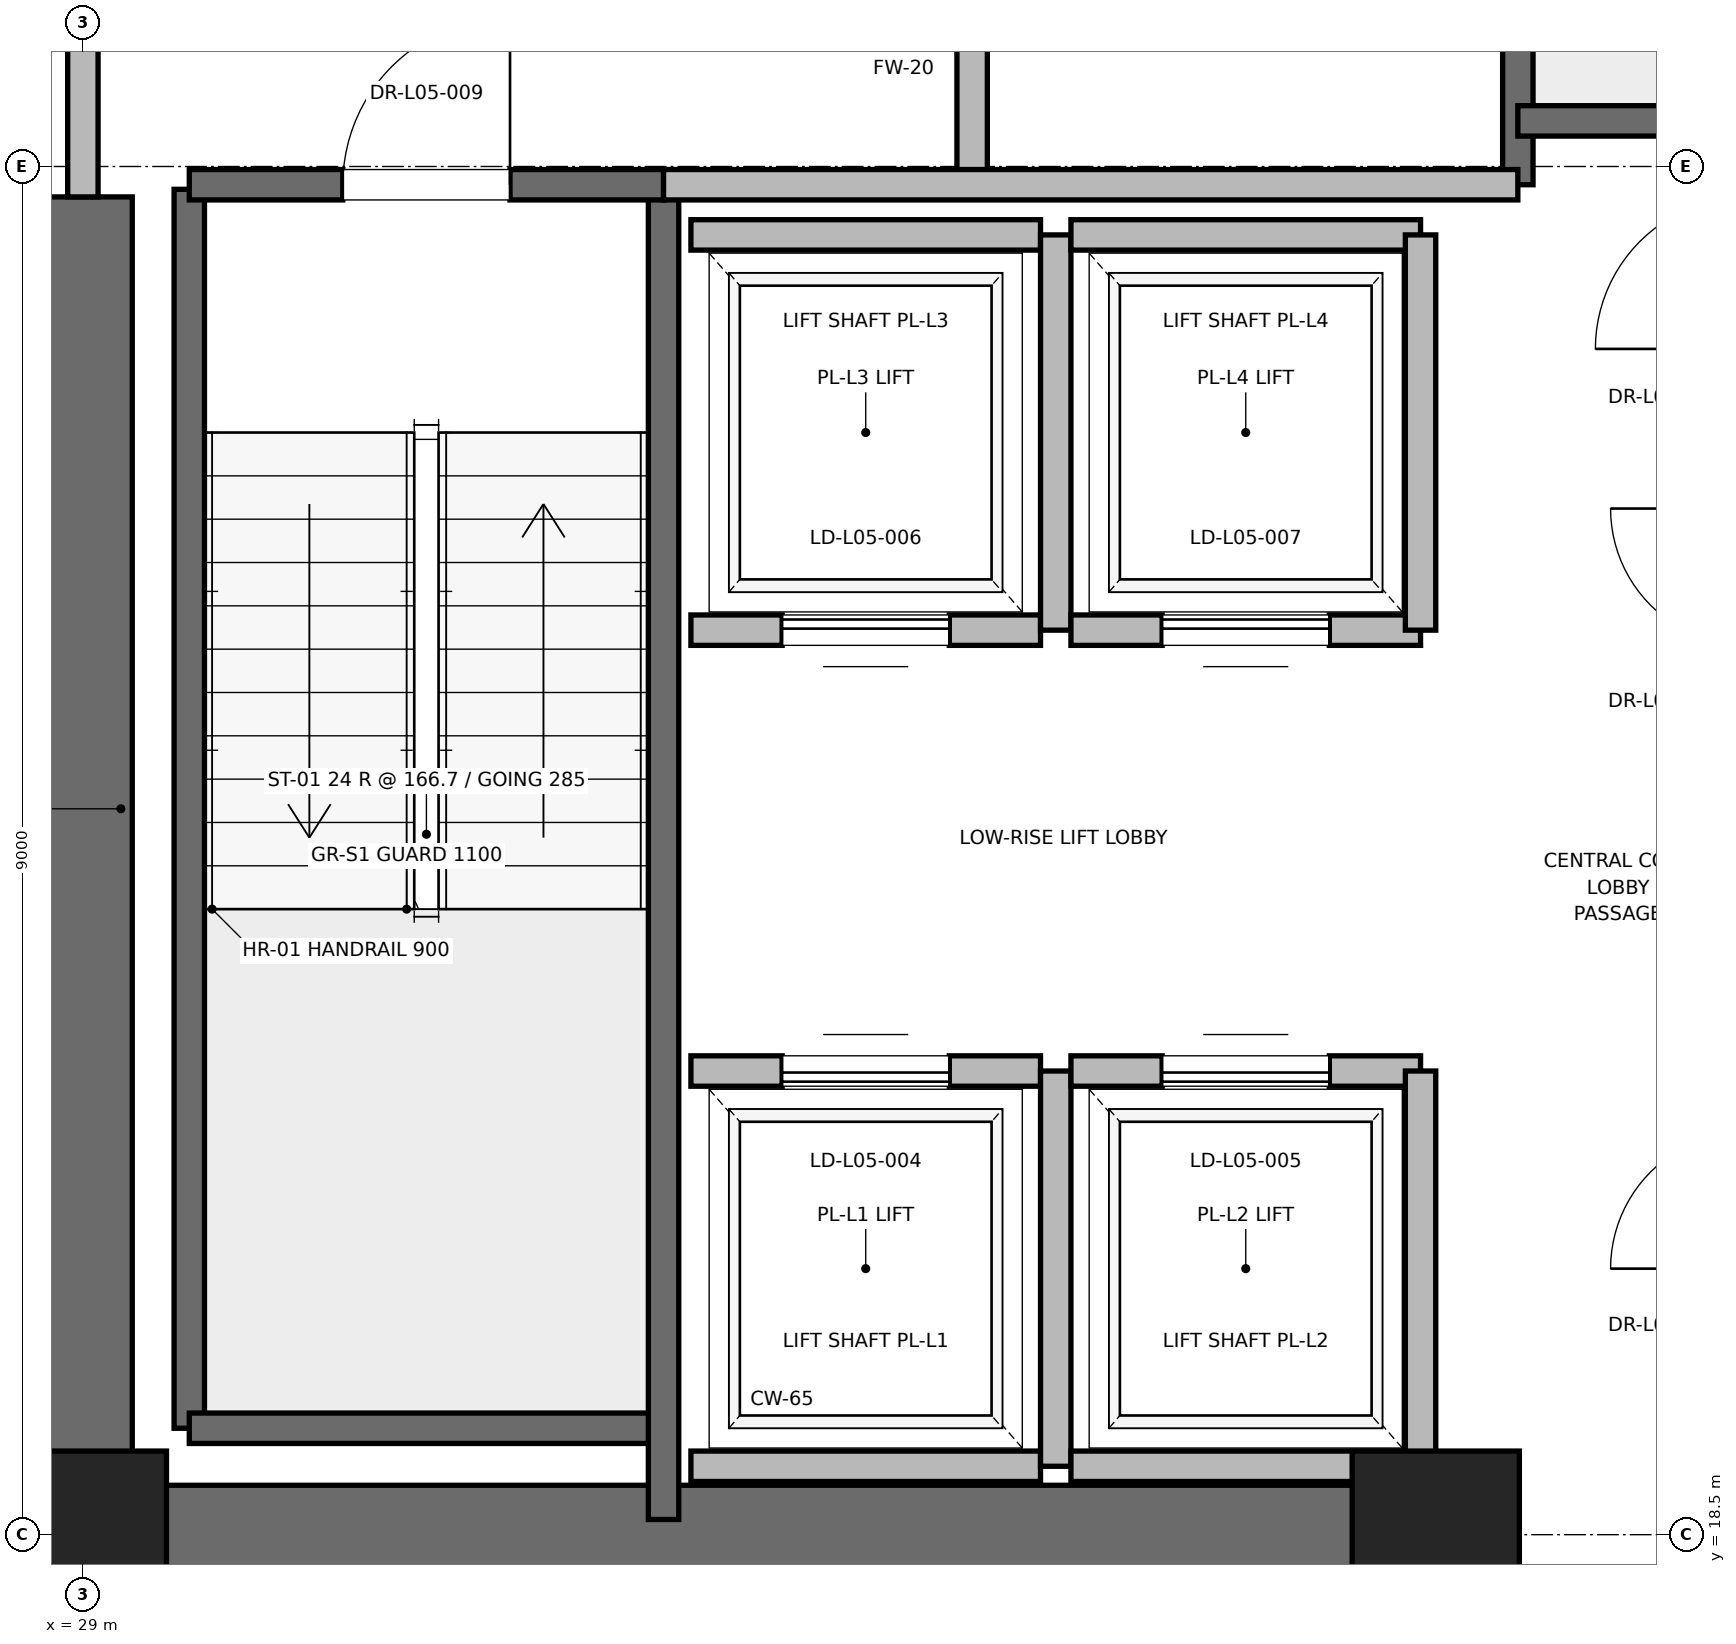
"""IFC4 building model, lengths in metres.
Left out: names, types, materials, properties, quantities, classifications, styles, units other than length and angle.
Written with IfcOpenShell. Run it as: python <this file> out.ifc"""

import sys

from ifc_helpers import new_model, si_unit, direction, frame, frame_2d, origin, origin_2d, place, context, subcontext, project, spatial, rectangle, extrude, element, fill, save


model = new_model("IFC4")
c1 = context("Model", 3, precision=1e-05, world=origin(), true_north=direction((0.0, 1.0)))
c2 = subcontext(c1, "Body", "Model", "MODEL_VIEW")
j1 = project(units=[si_unit("LENGTHUNIT", "METRE"), si_unit("PLANEANGLEUNIT", "RADIAN")], contexts=[c1])
p1 = place(None, origin())
s1 = spatial("IfcSite", under=j1, at=p1, CompositionType="ELEMENT")
p2 = place(p1, origin())
s2 = spatial("IfcBuilding", under=s1, at=p2, CompositionType="ELEMENT")
p3 = place(p2, frame((0.0, 0.0, 27.6)))
s3 = spatial("IfcBuildingStorey", under=s2, at=p3, CompositionType="ELEMENT", Elevation=27.6)
for number, where, z_axis, x_axis in (
    (1, (29.0, 18.5, 0.0), (0.0, 0.0, 1.0), (1.0, 0.0, 0.0)),
    (2, (37.9, 18.5, 0.0), (0.0, 0.0, 1.0), (1.0, 0.0, 0.0)),
):
    element("IfcColumn", number, at=place(p3, frame(where, z_axis=z_axis, x_axis=x_axis)), inside=s3, PredefinedType="PILASTER", context=c2, shape_type="SweptSolid", body=[
        extrude(rectangle(XDim=1.1, YDim=1.1, at=origin_2d()), origin(), (0.0, 0.0, 1.0), 4.0),
    ])
p4 = place(p3, frame((29.0, 18.5, 0.0), z_axis=(0.0, 0.0, 1.0), x_axis=(1.0, 0.0, 0.0)))
e3 = element("IfcWall", 3, at=p4, inside=s3, PredefinedType="SHEAR", context=c2, shape_type="SweptSolid", body=[
    extrude(rectangle(XDim=9.2, YDim=0.65, at=frame_2d((4.6, 0.0))), origin(), (0.0, 0.0, 1.0), 3.76),
])
p5 = place(p3, frame((29.0, 18.5, 0.0), z_axis=(0.0, 0.0, 1.0), x_axis=(0.0, 1.0, 0.0)))
e4 = element("IfcWall", 4, at=p5, inside=s3, PredefinedType="SHEAR", context=c2, shape_type="SweptSolid", body=[
    extrude(rectangle(XDim=8.8, YDim=0.65, at=frame_2d((4.4, 0.0))), origin(), (0.0, 0.0, 1.0), 3.76),
])
p6 = place(p3, frame((29.7, 19.2, 0.0), z_axis=(0.0, 0.0, 1.0), x_axis=(0.0, 1.0, 0.0)))
e5 = element("IfcWall", 5, at=p6, inside=s3, PredefinedType="SOLIDWALL", context=c2, shape_type="SweptSolid", body=[
    extrude(rectangle(XDim=8.15, YDim=0.2, at=frame_2d((4.075, 0.0))), origin(), (0.0, 0.0, 1.0), 3.76),
])
p7 = place(p3, frame((29.7, 19.2, 0.0), z_axis=(0.0, 0.0, 1.0), x_axis=(1.0, 0.0, 0.0)))
e6 = element("IfcWall", 6, at=p7, inside=s3, PredefinedType="SOLIDWALL", context=c2, shape_type="SweptSolid", body=[
    extrude(rectangle(XDim=3.12, YDim=0.2, at=frame_2d((1.56, 0.0))), origin(), (0.0, 0.0, 1.0), 3.76),
])
p8 = place(p3, frame((32.82, 18.6, 0.0), z_axis=(0.0, 0.0, 1.0), x_axis=(0.0, 1.0, 0.0)))
e7 = element("IfcWall", 7, at=p8, inside=s3, PredefinedType="SOLIDWALL", context=c2, shape_type="SweptSolid", body=[
    extrude(rectangle(XDim=8.78, YDim=0.2, at=frame_2d((4.39, 0.0))), origin(), (0.0, 0.0, 1.0), 3.76),
])
p9 = place(p3, frame((29.7, 27.38, 0.0), z_axis=(0.0, 0.0, 1.0), x_axis=(1.0, 0.0, 0.0)))
e8 = element("IfcWall", 8, at=p9, inside=s3, PredefinedType="SOLIDWALL", context=c2, shape_type="SweptSolid", body=[
    extrude(rectangle(XDim=3.12, YDim=0.2, at=frame_2d((1.56, 0.0))), origin(), (0.0, 0.0, 1.0), 3.76),
])
p10 = place(p9, frame((1.01, 0.0, 0.0)))
e9 = element("IfcOpeningElement", 9, at=p10, cuts=e8, PredefinedType="OPENING", context=c2, shape_type="SweptSolid", body=[
    extrude(rectangle(XDim=1.1, YDim=2.15, at=frame_2d((0.55, 1.075))), frame((0.0, 0.1, 0.0), z_axis=(0.0, -1.0, 0.0), x_axis=(1.0, 0.0, 0.0)), (0.0, 0.0, 1.0), 0.2),
])
p11 = place(p3, frame((38.44, 27.38, 0.0), z_axis=(0.0, 0.0, 1.0), x_axis=(0.0, 1.0, 0.0)))
e10 = element("IfcWall", 10, at=p11, inside=s3, PredefinedType="SOLIDWALL", context=c2, shape_type="SweptSolid", body=[
    extrude(rectangle(XDim=8.87, YDim=0.2, at=frame_2d((4.435, 0.0))), origin(), (0.0, 0.0, 1.0), 3.76),
])
p12 = place(p3, frame((38.44, 27.8, 0.0), z_axis=(0.0, 0.0, 1.0), x_axis=(1.0, 0.0, 0.0)))
e11 = element("IfcWall", 11, at=p12, inside=s3, PredefinedType="SOLIDWALL", context=c2, shape_type="SweptSolid", body=[
    extrude(rectangle(XDim=3.32, YDim=0.2, at=frame_2d((1.66, 0.0))), origin(), (0.0, 0.0, 1.0), 3.76),
])
p13 = place(p3, frame((34.85, 27.38, 0.0), z_axis=(0.0, 0.0, 1.0), x_axis=(0.0, 1.0, 0.0)))
e12 = element("IfcWall", 12, at=p13, inside=s3, PredefinedType="PARTITIONING", context=c2, shape_type="SweptSolid", body=[
    extrude(rectangle(XDim=3.37, YDim=0.2, at=frame_2d((1.685, 0.0))), origin(), (0.0, 0.0, 1.0), 3.76),
])
p14 = place(p13, frame((1.11, 0.0, 0.0)))
e13 = element("IfcOpeningElement", 13, at=p14, cuts=e12, PredefinedType="OPENING", context=c2, shape_type="SweptSolid", body=[
    extrude(rectangle(XDim=1.15, YDim=2.2, at=frame_2d((0.575, 1.1))), frame((0.0, 0.1, 0.0), z_axis=(0.0, -1.0, 0.0), x_axis=(1.0, 0.0, 0.0)), (0.0, 0.0, 1.0), 0.2),
])
p15 = place(p3, frame((29.0, 27.3, 0.0), z_axis=(0.0, 0.0, 1.0), x_axis=(0.0, 1.0, 0.0)))
e14 = element("IfcWall", 14, at=p15, inside=s3, PredefinedType="PARTITIONING", context=c2, shape_type="SweptSolid", body=[
    extrude(rectangle(XDim=3.4, YDim=0.2, at=frame_2d((1.7, 0.0))), origin(), (0.0, 0.0, 1.0), 2.54),
])
p16 = place(p15, frame((1.125, 0.0, 0.0)))
e15 = element("IfcOpeningElement", 15, at=p16, cuts=e14, PredefinedType="OPENING", context=c2, shape_type="SweptSolid", body=[
    extrude(rectangle(XDim=1.15, YDim=2.2, at=frame_2d((0.575, 1.1))), frame((0.0, 0.1, 0.0), z_axis=(0.0, -1.0, 0.0), x_axis=(1.0, 0.0, 0.0)), (0.0, 0.0, 1.0), 0.2),
])
p17 = place(p3, frame((32.82, 27.38, 0.0), z_axis=(0.0, 0.0, 1.0), x_axis=(1.0, 0.0, 0.0)))
e16 = element("IfcWall", 16, at=p17, inside=s3, PredefinedType="PARTITIONING", context=c2, shape_type="SweptSolid", body=[
    extrude(rectangle(XDim=5.62, YDim=0.2, at=frame_2d((2.81, 0.0))), origin(), (0.0, 0.0, 1.0), 3.76),
])
p18 = place(p3, frame((33.0, 18.95, 0.0), z_axis=(0.0, 0.0, 1.0), x_axis=(1.0, 0.0, 0.0)))
e17 = element("IfcWall", 17, at=p18, inside=s3, PredefinedType="SOLIDWALL", context=c2, shape_type="SweptSolid", body=[
    extrude(rectangle(XDim=2.3, YDim=0.2, at=frame_2d((1.15, 0.0))), origin(), (0.0, 0.0, 1.0), 3.76),
])
p19 = place(p3, frame((35.3, 21.55, 0.0), z_axis=(0.0, 0.0, 1.0), x_axis=(-1.0, 0.0, 0.0)))
e18 = element("IfcWall", 18, at=p19, inside=s3, PredefinedType="SOLIDWALL", context=c2, shape_type="SweptSolid", body=[
    extrude(rectangle(XDim=2.3, YDim=0.2, at=frame_2d((1.15, 0.0))), origin(), (0.0, 0.0, 1.0), 3.76),
])
p20 = place(p19, frame((0.6, 0.0, 0.0)))
e19 = element("IfcOpeningElement", 19, at=p20, cuts=e18, PredefinedType="OPENING", context=c2, shape_type="SweptSolid", body=[
    extrude(rectangle(XDim=1.1, YDim=2.2, at=frame_2d((0.55, 1.1))), frame((0.0, 0.1, 0.0), z_axis=(0.0, -1.0, 0.0), x_axis=(1.0, 0.0, 0.0)), (0.0, 0.0, 1.0), 0.2),
])
p21 = place(p3, frame((35.4, 18.95, 0.0), z_axis=(0.0, 0.0, 1.0), x_axis=(0.0, 1.0, 0.0)))
e20 = element("IfcWall", 20, at=p21, inside=s3, PredefinedType="SOLIDWALL", context=c2, shape_type="SweptSolid", body=[
    extrude(rectangle(XDim=2.6, YDim=0.2, at=frame_2d((1.3, 0.0))), origin(), (0.0, 0.0, 1.0), 3.76),
])
p22 = place(p3, frame((35.5, 18.95, 0.0), z_axis=(0.0, 0.0, 1.0), x_axis=(1.0, 0.0, 0.0)))
e21 = element("IfcWall", 21, at=p22, inside=s3, PredefinedType="SOLIDWALL", context=c2, shape_type="SweptSolid", body=[
    extrude(rectangle(XDim=2.3, YDim=0.2, at=frame_2d((1.15, 0.0))), origin(), (0.0, 0.0, 1.0), 2.54),
])
p23 = place(p3, frame((37.8, 21.55, 0.0), z_axis=(0.0, 0.0, 1.0), x_axis=(-1.0, 0.0, 0.0)))
e22 = element("IfcWall", 22, at=p23, inside=s3, PredefinedType="SOLIDWALL", context=c2, shape_type="SweptSolid", body=[
    extrude(rectangle(XDim=2.3, YDim=0.2, at=frame_2d((1.15, 0.0))), origin(), (0.0, 0.0, 1.0), 3.76),
])
p24 = place(p23, frame((0.6, 0.0, 0.0)))
e23 = element("IfcOpeningElement", 23, at=p24, cuts=e22, PredefinedType="OPENING", context=c2, shape_type="SweptSolid", body=[
    extrude(rectangle(XDim=1.1, YDim=2.2, at=frame_2d((0.55, 1.1))), frame((0.0, 0.1, 0.0), z_axis=(0.0, -1.0, 0.0), x_axis=(1.0, 0.0, 0.0)), (0.0, 0.0, 1.0), 0.2),
])
p25 = place(p3, frame((37.8, 18.95, 0.0), z_axis=(0.0, 0.0, 1.0), x_axis=(0.0, 1.0, 0.0)))
e24 = element("IfcWall", 24, at=p25, inside=s3, PredefinedType="SOLIDWALL", context=c2, shape_type="SweptSolid", body=[
    extrude(rectangle(XDim=2.6, YDim=0.2, at=frame_2d((1.3, 0.0))), origin(), (0.0, 0.0, 1.0), 2.54),
])
p26 = place(p3, frame((33.0, 24.45, 0.0), z_axis=(0.0, 0.0, 1.0), x_axis=(1.0, 0.0, 0.0)))
e25 = element("IfcWall", 25, at=p26, inside=s3, PredefinedType="SOLIDWALL", context=c2, shape_type="SweptSolid", body=[
    extrude(rectangle(XDim=2.3, YDim=0.2, at=frame_2d((1.15, 0.0))), origin(), (0.0, 0.0, 1.0), 3.76),
])
p27 = place(p26, frame((0.6, 0.0, 0.0)))
e26 = element("IfcOpeningElement", 26, at=p27, cuts=e25, PredefinedType="OPENING", context=c2, shape_type="SweptSolid", body=[
    extrude(rectangle(XDim=1.1, YDim=2.2, at=frame_2d((0.55, 1.1))), frame((0.0, 0.1, 0.0), z_axis=(0.0, -1.0, 0.0), x_axis=(1.0, 0.0, 0.0)), (0.0, 0.0, 1.0), 0.2),
])
p28 = place(p3, frame((35.3, 27.05, 0.0), z_axis=(0.0, 0.0, 1.0), x_axis=(-1.0, 0.0, 0.0)))
e27 = element("IfcWall", 27, at=p28, inside=s3, PredefinedType="SOLIDWALL", context=c2, shape_type="SweptSolid", body=[
    extrude(rectangle(XDim=2.3, YDim=0.2, at=frame_2d((1.15, 0.0))), origin(), (0.0, 0.0, 1.0), 3.76),
])
p29 = place(p3, frame((35.4, 24.45, 0.0), z_axis=(0.0, 0.0, 1.0), x_axis=(0.0, 1.0, 0.0)))
e28 = element("IfcWall", 28, at=p29, inside=s3, PredefinedType="SOLIDWALL", context=c2, shape_type="SweptSolid", body=[
    extrude(rectangle(XDim=2.6, YDim=0.2, at=frame_2d((1.3, 0.0))), origin(), (0.0, 0.0, 1.0), 3.76),
])
p30 = place(p3, frame((35.5, 24.45, 0.0), z_axis=(0.0, 0.0, 1.0), x_axis=(1.0, 0.0, 0.0)))
e29 = element("IfcWall", 29, at=p30, inside=s3, PredefinedType="SOLIDWALL", context=c2, shape_type="SweptSolid", body=[
    extrude(rectangle(XDim=2.3, YDim=0.2, at=frame_2d((1.15, 0.0))), origin(), (0.0, 0.0, 1.0), 3.76),
])
p31 = place(p30, frame((0.6, 0.0, 0.0)))
e30 = element("IfcOpeningElement", 30, at=p31, cuts=e29, PredefinedType="OPENING", context=c2, shape_type="SweptSolid", body=[
    extrude(rectangle(XDim=1.1, YDim=2.2, at=frame_2d((0.55, 1.1))), frame((0.0, 0.1, 0.0), z_axis=(0.0, -1.0, 0.0), x_axis=(1.0, 0.0, 0.0)), (0.0, 0.0, 1.0), 0.2),
])
p32 = place(p3, frame((37.8, 27.05, 0.0), z_axis=(0.0, 0.0, 1.0), x_axis=(-1.0, 0.0, 0.0)))
e31 = element("IfcWall", 31, at=p32, inside=s3, PredefinedType="SOLIDWALL", context=c2, shape_type="SweptSolid", body=[
    extrude(rectangle(XDim=2.3, YDim=0.2, at=frame_2d((1.15, 0.0))), origin(), (0.0, 0.0, 1.0), 3.76),
])
p33 = place(p3, frame((37.8, 24.45, 0.0), z_axis=(0.0, 0.0, 1.0), x_axis=(0.0, 1.0, 0.0)))
e32 = element("IfcWall", 32, at=p33, inside=s3, PredefinedType="SOLIDWALL", context=c2, shape_type="SweptSolid", body=[
    extrude(rectangle(XDim=2.6, YDim=0.2, at=frame_2d((1.3, 0.0))), origin(), (0.0, 0.0, 1.0), 3.76),
])
p34 = place(p10, origin())
e33 = element("IfcDoor", 33, at=p34, inside=s3, OperationType="SINGLE_SWING_RIGHT", PredefinedType="DOOR", context=c2, shape_type="SweptSolid", body=[
    extrude(rectangle(XDim=1.1, YDim=2.15, at=frame_2d((0.55, 1.075))), frame((0.0, 0.025, 0.0), z_axis=(0.0, -1.0, 0.0), x_axis=(1.0, 0.0, 0.0)), (0.0, 0.0, 1.0), 0.05),
])
fill(e9, e33)
p35 = place(p20, origin())
e34 = element("IfcDoor", 34, at=p35, inside=s3, OperationType="SLIDING_TO_RIGHT", PredefinedType="DOOR", context=c2, shape_type="SweptSolid", body=[
    extrude(rectangle(XDim=1.1, YDim=2.2, at=frame_2d((0.55, 1.1))), frame((0.0, 0.025, 0.0), z_axis=(0.0, -1.0, 0.0), x_axis=(1.0, 0.0, 0.0)), (0.0, 0.0, 1.0), 0.05),
])
fill(e19, e34)
p36 = place(p24, origin())
e35 = element("IfcDoor", 35, at=p36, inside=s3, OperationType="SLIDING_TO_RIGHT", PredefinedType="DOOR", context=c2, shape_type="SweptSolid", body=[
    extrude(rectangle(XDim=1.1, YDim=2.2, at=frame_2d((0.55, 1.1))), frame((0.0, 0.025, 0.0), z_axis=(0.0, -1.0, 0.0), x_axis=(1.0, 0.0, 0.0)), (0.0, 0.0, 1.0), 0.05),
])
fill(e23, e35)
p37 = place(p27, origin())
e36 = element("IfcDoor", 36, at=p37, inside=s3, OperationType="SLIDING_TO_RIGHT", PredefinedType="DOOR", context=c2, shape_type="SweptSolid", body=[
    extrude(rectangle(XDim=1.1, YDim=2.2, at=frame_2d((0.55, 1.1))), frame((0.0, 0.025, 0.0), z_axis=(0.0, -1.0, 0.0), x_axis=(1.0, 0.0, 0.0)), (0.0, 0.0, 1.0), 0.05),
])
fill(e26, e36)
p38 = place(p31, origin())
e37 = element("IfcDoor", 37, at=p38, inside=s3, OperationType="SLIDING_TO_RIGHT", PredefinedType="DOOR", context=c2, shape_type="SweptSolid", body=[
    extrude(rectangle(XDim=1.1, YDim=2.2, at=frame_2d((0.55, 1.1))), frame((0.0, 0.025, 0.0), z_axis=(0.0, -1.0, 0.0), x_axis=(1.0, 0.0, 0.0)), (0.0, 0.0, 1.0), 0.05),
])
fill(e30, e37)
save(model, sys.argv[1])
